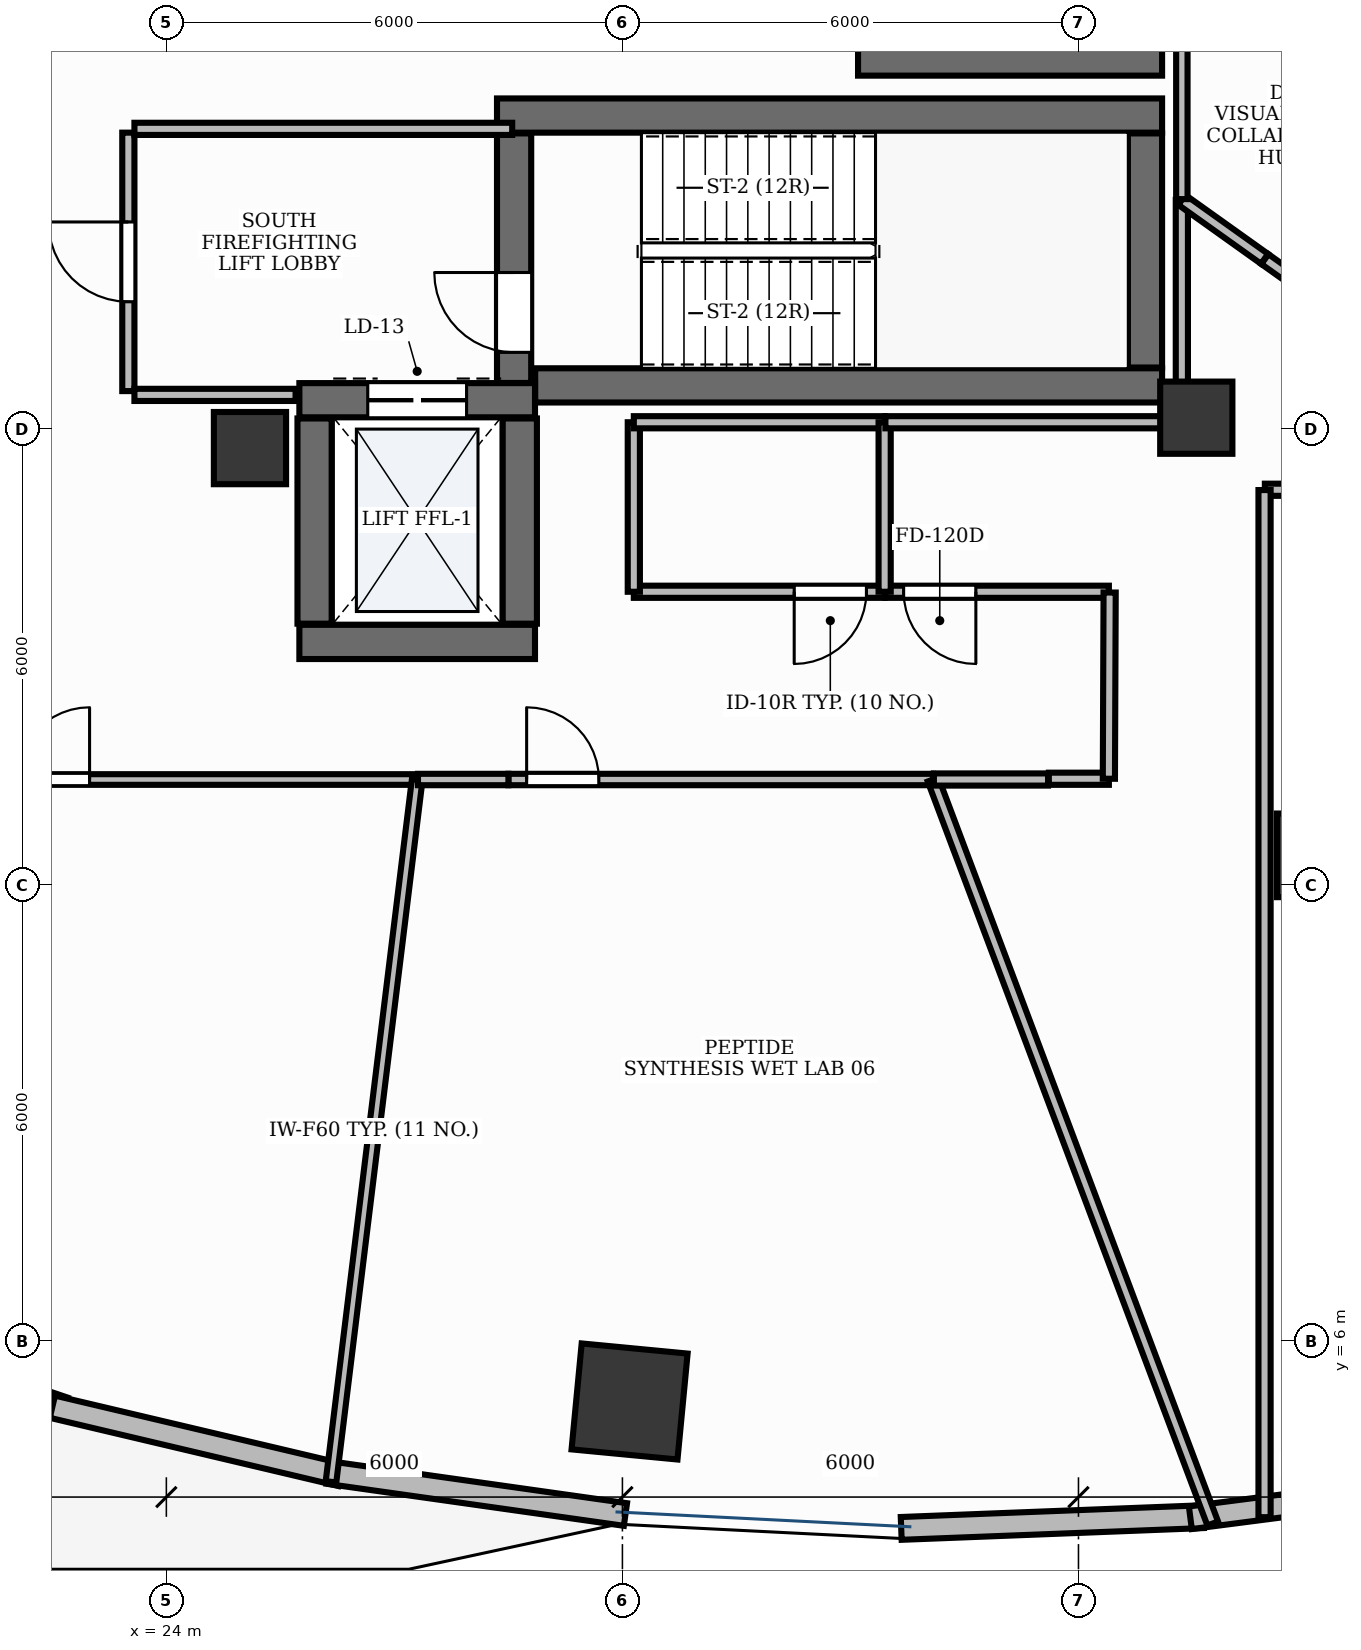
"""IFC4 building model, lengths in metres.
Left out: names, types, materials, properties, quantities, classifications, styles, units other than length and angle.
Written with IfcOpenShell. Run it as: python <this file> out.ifc"""

import sys

from ifc_helpers import new_model, si_unit, direction, frame, frame_2d, origin, origin_2d, place, context, subcontext, project, spatial, rectangle, extrude, element, fill, save


model = new_model("IFC4")
c1 = context("Model", 3, precision=1e-05, world=origin(), true_north=direction((0.0, 1.0)))
c2 = subcontext(c1, "Body", "Model", "MODEL_VIEW")
j1 = project(units=[si_unit("LENGTHUNIT", "METRE"), si_unit("PLANEANGLEUNIT", "RADIAN")], contexts=[c1])
p1 = place(None, origin())
s1 = spatial("IfcSite", under=j1, at=p1, CompositionType="ELEMENT")
p2 = place(p1, origin())
s2 = spatial("IfcBuilding", under=s1, at=p2, CompositionType="ELEMENT")
p3 = place(p2, frame((0.0, 0.0, 59.4)))
s3 = spatial("IfcBuildingStorey", under=s2, at=p3, CompositionType="ELEMENT", Elevation=59.4)
p4 = place(p3, frame((28.852, 18.575, 0.0), z_axis=(0.0, 0.0, 1.0), x_axis=(1.0, 0.0, 0.0)))
e1 = element("IfcWall", 1, at=p4, inside=s3, PredefinedType="SHEAR", context=c2, shape_type="SweptSolid", body=[
    extrude(rectangle(XDim=8.248, YDim=0.45, at=frame_2d((4.124, 0.0))), origin(), (0.0, 0.0, 1.0), 3.9),
])
p5 = place(p3, frame((28.35, 22.125, 0.0), z_axis=(0.0, 0.0, 1.0), x_axis=(1.0, 0.0, 0.0)))
e2 = element("IfcWall", 2, at=p5, inside=s3, PredefinedType="SHEAR", context=c2, shape_type="SweptSolid", body=[
    extrude(rectangle(XDim=8.75, YDim=0.45, at=frame_2d((4.375, 0.0))), origin(), (0.0, 0.0, 1.0), 3.9),
])
p6 = place(p3, frame((36.875, 18.81, 0.0), z_axis=(0.0, 0.0, 1.0), x_axis=(0.0, 1.0, 0.0)))
e3 = element("IfcWall", 3, at=p6, inside=s3, PredefinedType="SHEAR", context=c2, shape_type="SweptSolid", body=[
    extrude(rectangle(XDim=3.08, YDim=0.45, at=frame_2d((1.54, 0.0))), origin(), (0.0, 0.0, 1.0), 3.9),
])
p7 = place(p3, frame((28.575, 18.607, 0.0), z_axis=(0.0, 0.0, 1.0), x_axis=(0.0, 1.0, 0.0)))
e4 = element("IfcWall", 4, at=p7, inside=s3, PredefinedType="SHEAR", context=c2, shape_type="SweptSolid", body=[
    extrude(rectangle(XDim=3.283, YDim=0.45, at=frame_2d((1.642, 0.0))), origin(), (0.0, 0.0, 1.0), 3.9),
])
p8 = place(p7, frame((0.403, 0.0, 0.0)))
e5 = element("IfcOpeningElement", 5, at=p8, cuts=e4, PredefinedType="OPENING", context=c2, shape_type="SweptSolid", body=[
    extrude(rectangle(XDim=1.05, YDim=2.15, at=frame_2d((0.525, 1.075))), frame((0.0, 0.24, 0.0), z_axis=(0.0, -1.0, 0.0), x_axis=(1.0, 0.0, 0.0)), (0.0, 0.0, 1.0), 0.48),
])
p9 = place(p3, frame((33.1, 22.875, 0.0), z_axis=(0.0, 0.0, 1.0), x_axis=(1.0, 0.0, 0.0)))
e6 = element("IfcWall", 6, at=p9, inside=s3, PredefinedType="SHEAR", context=c2, shape_type="SweptSolid", body=[
    extrude(rectangle(XDim=4.0, YDim=0.45, at=frame_2d((2.0, 0.0))), origin(), (0.0, 0.0, 1.0), 3.9),
])
p10 = place(p3, frame((25.75, 15.2, 0.0), z_axis=(0.0, 0.0, 1.0), x_axis=(1.0, 0.0, 0.0)))
e7 = element("IfcWall", 7, at=p10, inside=s3, PredefinedType="SHEAR", context=c2, shape_type="SweptSolid", body=[
    extrude(rectangle(XDim=3.1, YDim=0.45, at=frame_2d((1.55, 0.0))), origin(), (0.0, 0.0, 1.0), 3.9),
])
p11 = place(p3, frame((25.75, 18.38, 0.0), z_axis=(0.0, 0.0, 1.0), x_axis=(1.0, 0.0, 0.0)))
e8 = element("IfcWall", 8, at=p11, inside=s3, PredefinedType="SHEAR", context=c2, shape_type="SweptSolid", body=[
    extrude(rectangle(XDim=3.1, YDim=0.45, at=frame_2d((1.55, 0.0))), origin(), (0.0, 0.0, 1.0), 3.9),
])
p12 = place(p11, frame((0.9, 0.0, 0.0)))
e9 = element("IfcOpeningElement", 9, at=p12, cuts=e8, PredefinedType="OPENING", context=c2, shape_type="SweptSolid", body=[
    extrude(rectangle(XDim=1.3, YDim=2.2, at=frame_2d((0.65, 1.1))), frame((0.0, 0.24, 0.0), z_axis=(0.0, -1.0, 0.0), x_axis=(1.0, 0.0, 0.0)), (0.0, 0.0, 1.0), 0.48),
])
for number, where, z_axis, x_axis in (
    (10, (25.95, 15.44, 0.0), (0.0, 0.0, 1.0), (0.0, 1.0, 0.0)),
    (11, (28.65, 15.44, 0.0), (0.0, 0.0, 1.0), (0.0, 1.0, 0.0)),
):
    element("IfcWall", number, at=place(p3, frame(where, z_axis=z_axis, x_axis=x_axis)), inside=s3, PredefinedType="SHEAR", context=c2, shape_type="SweptSolid", body=[
        extrude(rectangle(XDim=2.7, YDim=0.45, at=frame_2d((1.35, 0.0))), origin(), (0.0, 0.0, 1.0), 3.9),
    ])
for number, where, z_axis, x_axis in (
    (12, (25.1, 17.75, -0.0), (0.0, 0.0, 1.0), (1.0, 0.0, 0.0)),
    (13, (37.55, 18.15, -0.0), (0.0, 0.0, 1.0), (1.0, 0.0, 0.0)),
):
    element("IfcColumn", number, at=place(p3, frame(where, z_axis=z_axis, x_axis=x_axis)), inside=s3, PredefinedType="PILASTER", context=c2, shape_type="SweptSolid", body=[
        extrude(rectangle(XDim=0.95, YDim=0.95, at=origin_2d()), origin(), (0.0, 0.0, 1.0), 3.901),
    ])
p13 = place(p3, frame((30.094, 5.208, -0.0), z_axis=(0.0, 0.0, 1.0), x_axis=(-0.995462868748, 0.095150811579, 0.0)))
e14 = element("IfcColumn", 14, at=p13, inside=s3, PredefinedType="COLUMN", context=c2, shape_type="SweptSolid", body=[
    extrude(rectangle(XDim=1.4, YDim=1.4, at=origin_2d()), origin(), (0.0, 0.0, 1.0), 3.901),
])
p14 = place(p3, frame((39.161, 12.392, -0.0), z_axis=(0.0, 0.0, 1.0), x_axis=(1.0, 0.0, 0.0)))
e15 = element("IfcColumn", 15, at=p14, inside=s3, PredefinedType="COLUMN", context=c2, shape_type="SweptSolid", body=[
    extrude(rectangle(XDim=1.1, YDim=1.1, at=origin_2d()), origin(), (0.0, 0.0, 1.0), 3.901),
])
p15 = place(p3, frame((19.065, 6.333, 0.0), z_axis=(0.0, 0.0, 1.0), x_axis=(0.947034337234, -0.321132315564, 0.0)))
e16 = element("IfcWall", 16, at=p15, inside=s3, PredefinedType="STANDARD", context=c2, shape_type="SweptSolid", body=[
    extrude(rectangle(XDim=3.79, YDim=0.3, at=frame_2d((1.895, 0.0))), origin(), (0.0, 0.0, 1.0), 3.9),
])
p16 = place(p15, frame((1.345, 0.0, 0.0)))
e17 = element("IfcOpeningElement", 17, at=p16, cuts=e16, PredefinedType="OPENING", context=c2, shape_type="SweptSolid", body=[
    extrude(rectangle(XDim=1.1, YDim=2.15, at=frame_2d((0.55, 1.075))), frame((0.0, 0.165, 0.0), z_axis=(0.0, -1.0, 0.0), x_axis=(1.0, 0.0, 0.0)), (0.0, 0.0, 1.0), 0.33),
])
p17 = place(p3, frame((22.5, 5.138, 0.0), z_axis=(0.0, 0.0, 1.0), x_axis=(0.973197600754, -0.229970497863, 0.0)))
e18 = element("IfcWall", 18, at=p17, inside=s3, PredefinedType="STANDARD", context=c2, shape_type="SweptSolid", body=[
    extrude(rectangle(XDim=3.901, YDim=0.3, at=frame_2d((1.951, 0.0))), origin(), (0.0, 0.0, 1.0), 3.9),
])
p18 = place(p3, frame((26.128, 4.273, 0.0), z_axis=(0.0, 0.0, 1.0), x_axis=(0.990165832998, -0.139898617443, 0.0)))
e19 = element("IfcWall", 19, at=p18, inside=s3, PredefinedType="STANDARD", context=c2, shape_type="SweptSolid", body=[
    extrude(rectangle(XDim=3.951, YDim=0.3, at=frame_2d((1.976, 0.0))), origin(), (0.0, 0.0, 1.0), 3.9),
])
p19 = place(p3, frame((33.668, 3.538, 0.0), z_axis=(0.0, 0.0, 1.0), x_axis=(0.999245411623, 0.038840794937, 0.0)))
e20 = element("IfcWall", 20, at=p19, inside=s3, PredefinedType="STANDARD", context=c2, shape_type="SweptSolid", body=[
    extrude(rectangle(XDim=3.979, YDim=0.3, at=frame_2d((1.989, 0.0))), origin(), (0.0, 0.0, 1.0), 3.9),
])
p20 = place(p3, frame((37.472, 3.678, 0.0), z_axis=(0.0, 0.0, 1.0), x_axis=(0.991734095036, 0.128310111617, 0.0)))
e21 = element("IfcWall", 21, at=p20, inside=s3, PredefinedType="STANDARD", context=c2, shape_type="SweptSolid", body=[
    extrude(rectangle(XDim=3.956, YDim=0.3, at=frame_2d((1.978, 0.0))), origin(), (0.0, 0.0, 1.0), 3.9),
])
p21 = place(p3, frame((23.5, 18.5, 0.0), z_axis=(0.0, 0.0, 1.0), x_axis=(0.0, 1.0, 0.0)))
e22 = element("IfcWall", 22, at=p21, inside=s3, PredefinedType="PARTITIONING", context=c2, shape_type="SweptSolid", body=[
    extrude(rectangle(XDim=3.4, YDim=0.16, at=frame_2d((1.7, 0.0))), origin(), (0.0, 0.0, 1.0), 2.91),
])
p22 = place(p21, frame((1.175, 0.0, 0.0)))
e23 = element("IfcOpeningElement", 23, at=p22, cuts=e22, PredefinedType="OPENING", context=c2, shape_type="SweptSolid", body=[
    extrude(rectangle(XDim=1.05, YDim=2.15, at=frame_2d((0.525, 1.075))), frame((0.0, 0.095, 0.0), z_axis=(0.0, -1.0, 0.0), x_axis=(1.0, 0.0, 0.0)), (0.0, 0.0, 1.0), 0.19),
])
p23 = place(p3, frame((23.58, 21.95, 0.0), z_axis=(0.0, 0.0, 1.0), x_axis=(1.0, 0.0, 0.0)))
e24 = element("IfcWall", 24, at=p23, inside=s3, PredefinedType="PARTITIONING", context=c2, shape_type="SweptSolid", body=[
    extrude(rectangle(XDim=4.97, YDim=0.16, at=frame_2d((2.485, 0.0))), origin(), (0.0, 0.0, 1.0), 2.91),
])
p24 = place(p3, frame((23.58, 18.45, 0.0), z_axis=(0.0, 0.0, 1.0), x_axis=(1.0, 0.0, 0.0)))
e25 = element("IfcWall", 25, at=p24, inside=s3, PredefinedType="PARTITIONING", context=c2, shape_type="SweptSolid", body=[
    extrude(rectangle(XDim=2.12, YDim=0.16, at=frame_2d((1.06, 0.0))), origin(), (0.0, 0.0, 1.0), 2.91),
])
p25 = place(p3, frame((33.45, 15.86, 0.0), z_axis=(0.0, 0.0, 1.0), x_axis=(-1.0, 0.0, 0.0)))
e26 = element("IfcWall", 26, at=p25, inside=s3, PredefinedType="PARTITIONING", context=c2, shape_type="SweptSolid", body=[
    extrude(rectangle(XDim=3.3, YDim=0.16, at=frame_2d((1.65, 0.0))), origin(), (0.0, 0.0, 1.0), 2.91),
])
p26 = place(p25, frame((0.24, 0.0, 0.0)))
e27 = element("IfcOpeningElement", 27, at=p26, cuts=e26, PredefinedType="OPENING", context=c2, shape_type="SweptSolid", body=[
    extrude(rectangle(XDim=0.95, YDim=2.15, at=frame_2d((0.475, 1.075))), frame((0.0, 0.095, 0.0), z_axis=(0.0, -1.0, 0.0), x_axis=(1.0, 0.0, 0.0)), (0.0, 0.0, 1.0), 0.19),
])
p27 = place(p3, frame((21.8, 13.39, 0.0), z_axis=(0.0, 0.0, 1.0), x_axis=(1.0, 0.0, 0.0)))
e28 = element("IfcWall", 28, at=p27, inside=s3, PredefinedType="PARTITIONING", context=c2, shape_type="SweptSolid", body=[
    extrude(rectangle(XDim=5.5, YDim=0.14, at=frame_2d((2.75, 0.0))), origin(), (0.0, 0.0, 1.0), 2.91),
])
p28 = place(p27, frame((0.24, 0.0, 0.0)))
e29 = element("IfcOpeningElement", 29, at=p28, cuts=e28, PredefinedType="OPENING", context=c2, shape_type="SweptSolid", body=[
    extrude(rectangle(XDim=0.95, YDim=2.15, at=frame_2d((0.475, 1.075))), frame((0.0, 0.085, 0.0), z_axis=(0.0, -1.0, 0.0), x_axis=(1.0, 0.0, 0.0)), (0.0, 0.0, 1.0), 0.17),
])
p29 = place(p3, frame((28.5, 13.39, 0.0), z_axis=(0.0, 0.0, 1.0), x_axis=(1.0, 0.0, 0.0)))
e30 = element("IfcWall", 30, at=p29, inside=s3, PredefinedType="PARTITIONING", context=c2, shape_type="SweptSolid", body=[
    extrude(rectangle(XDim=5.587, YDim=0.15, at=frame_2d((2.793, 0.0))), origin(), (0.0, 0.0, 1.0), 2.91),
])
p30 = place(p29, frame((0.24, 0.0, 0.0)))
e31 = element("IfcOpeningElement", 31, at=p30, cuts=e30, PredefinedType="OPENING", context=c2, shape_type="SweptSolid", body=[
    extrude(rectangle(XDim=0.95, YDim=2.15, at=frame_2d((0.475, 1.075))), frame((0.0, 0.09, 0.0), z_axis=(0.0, -1.0, 0.0), x_axis=(1.0, 0.0, 0.0)), (0.0, 0.0, 1.0), 0.18),
])
p31 = place(p3, frame((36.4, 15.86, 0.0), z_axis=(0.0, 0.0, 1.0), x_axis=(-1.0, 0.0, 0.0)))
e32 = element("IfcWall", 32, at=p31, inside=s3, PredefinedType="PARTITIONING", context=c2, shape_type="SweptSolid", body=[
    extrude(rectangle(XDim=2.94, YDim=0.16, at=frame_2d((1.47, 0.0))), origin(), (0.0, 0.0, 1.0), 2.91),
])
p32 = place(p31, frame((1.75, 0.0, 0.0)))
e33 = element("IfcOpeningElement", 33, at=p32, cuts=e32, PredefinedType="OPENING", context=c2, shape_type="SweptSolid", body=[
    extrude(rectangle(XDim=0.95, YDim=2.15, at=frame_2d((0.475, 1.075))), frame((0.0, 0.095, 0.0), z_axis=(0.0, -1.0, 0.0), x_axis=(1.0, 0.0, 0.0)), (0.0, 0.0, 1.0), 0.19),
])
p33 = place(p3, frame((30.15, 15.86, 0.0), z_axis=(0.0, 0.0, 1.0), x_axis=(0.0, 1.0, 0.0)))
e34 = element("IfcWall", 34, at=p33, inside=s3, PredefinedType="PARTITIONING", context=c2, shape_type="SweptSolid", body=[
    extrude(rectangle(XDim=2.23, YDim=0.16, at=frame_2d((1.115, 0.0))), origin(), (0.0, 0.0, 1.0), 2.91),
])
p34 = place(p3, frame((30.15, 18.09, 0.0), z_axis=(0.0, 0.0, 1.0), x_axis=(1.0, 0.0, 0.0)))
e35 = element("IfcWall", 35, at=p34, inside=s3, PredefinedType="PARTITIONING", context=c2, shape_type="SweptSolid", body=[
    extrude(rectangle(XDim=3.3, YDim=0.16, at=frame_2d((1.65, 0.0))), origin(), (0.0, 0.0, 1.0), 2.91),
])
p35 = place(p3, frame((33.45, 18.09, 0.0), z_axis=(0.0, 0.0, 1.0), x_axis=(0.0, -1.0, 0.0)))
e36 = element("IfcWall", 36, at=p35, inside=s3, PredefinedType="PARTITIONING", context=c2, shape_type="SweptSolid", body=[
    extrude(rectangle(XDim=2.23, YDim=0.16, at=frame_2d((1.115, 0.0))), origin(), (0.0, 0.0, 1.0), 2.91),
])
p36 = place(p3, frame((27.301, 13.39, 0.0), z_axis=(0.0, 0.0, 1.0), x_axis=(-0.121878156066, -0.992545069543, 0.0)))
e37 = element("IfcWall", 37, at=p36, inside=s3, PredefinedType="PARTITIONING", context=c2, shape_type="SweptSolid", body=[
    extrude(rectangle(XDim=9.309, YDim=0.14, at=frame_2d((4.654, 0.0))), origin(), (0.0, 0.0, 1.0), 2.91),
])
p37 = place(p3, frame((27.311, 13.39, 0.0), z_axis=(0.0, 0.0, 1.0), x_axis=(1.0, 0.0, 0.0)))
e38 = element("IfcWall", 38, at=p37, inside=s3, PredefinedType="PARTITIONING", context=c2, shape_type="SweptSolid", body=[
    extrude(rectangle(XDim=1.189, YDim=0.15, at=frame_2d((0.595, 0.0))), origin(), (0.0, 0.0, 1.0), 2.91),
])
p38 = place(p3, frame((34.087, 13.39, 0.0), z_axis=(0.0, 0.0, 1.0), x_axis=(0.351837225237, -0.936061198286, 0.0)))
e39 = element("IfcWall", 39, at=p38, inside=s3, PredefinedType="PARTITIONING", context=c2, shape_type="SweptSolid", body=[
    extrude(rectangle(XDim=10.456, YDim=0.15, at=frame_2d((5.228, 0.0))), origin(), (0.0, 0.0, 1.0), 2.91),
])
p39 = place(p3, frame((38.452, 20.237, 0.0), z_axis=(0.0, 0.0, 1.0), x_axis=(0.814086766517, -0.580743262192, 0.0)))
e40 = element("IfcWall", 40, at=p39, inside=s3, PredefinedType="PARTITIONING", context=c2, shape_type="SweptSolid", body=[
    extrude(rectangle(XDim=2.38, YDim=0.16, at=frame_2d((1.19, 0.0))), origin(), (0.0, 0.0, 1.0), 2.91),
])
p40 = place(p3, frame((40.39, 17.202, 0.0), z_axis=(0.0, 0.0, 1.0), x_axis=(-1.0, 0.0, 0.0)))
e41 = element("IfcWall", 41, at=p40, inside=s3, PredefinedType="PARTITIONING", context=c2, shape_type="SweptSolid", body=[
    extrude(rectangle(XDim=1.938, YDim=0.16, at=frame_2d((0.969, 0.0))), origin(), (0.0, 0.0, 1.0), 2.91),
])
p41 = place(p3, frame((38.448, 17.198, 0.0), z_axis=(0.0, 0.0, 1.0), x_axis=(0.0, -1.0, 0.0)))
e42 = element("IfcWall", 42, at=p41, inside=s3, PredefinedType="PARTITIONING", context=c2, shape_type="SweptSolid", body=[
    extrude(rectangle(XDim=13.513, YDim=0.16, at=frame_2d((6.756, 0.0))), origin(), (0.0, 0.0, 1.0), 2.91),
])
p42 = place(p3, frame((34.098, 13.39, 0.0), z_axis=(0.0, 0.0, 1.0), x_axis=(1.0, 0.0, 0.0)))
e43 = element("IfcWall", 43, at=p42, inside=s3, PredefinedType="PARTITIONING", context=c2, shape_type="SweptSolid", body=[
    extrude(rectangle(XDim=1.502, YDim=0.16, at=frame_2d((0.751, 0.0))), origin(), (0.0, 0.0, 1.0), 2.91),
])
p43 = place(p3, frame((35.61, 13.4, 0.0), z_axis=(0.0, 0.0, 1.0), x_axis=(1.0, 0.0, 0.0)))
e44 = element("IfcWall", 44, at=p43, inside=s3, PredefinedType="PARTITIONING", context=c2, shape_type="SweptSolid", body=[
    extrude(rectangle(XDim=0.79, YDim=0.16, at=frame_2d((0.395, 0.0))), origin(), (0.0, 0.0, 1.0), 2.91),
])
p44 = place(p3, frame((36.4, 13.4, 0.0), z_axis=(0.0, 0.0, 1.0), x_axis=(0.004085258855, 0.999991655295, 0.0)))
e45 = element("IfcWall", 45, at=p44, inside=s3, PredefinedType="PARTITIONING", context=c2, shape_type="SweptSolid", body=[
    extrude(rectangle(XDim=2.45, YDim=0.16, at=frame_2d((1.225, 0.0))), origin(), (0.0, 0.0, 1.0), 2.91),
])
p45 = place(p3, frame((33.46, 18.09, 0.0), z_axis=(0.0, 0.0, 1.0), x_axis=(1.0, 0.0, 0.0)))
e46 = element("IfcWall", 46, at=p45, inside=s3, PredefinedType="PARTITIONING", context=c2, shape_type="SweptSolid", body=[
    extrude(rectangle(XDim=3.89, YDim=0.16, at=frame_2d((1.945, 0.0))), origin(), (0.0, 0.0, 1.0), 2.91),
])
p46 = place(p3, frame((37.36, 18.1, 0.0), z_axis=(0.0, 0.0, 1.0), x_axis=(0.0, 1.0, 0.0)))
e47 = element("IfcWall", 47, at=p46, inside=s3, PredefinedType="PARTITIONING", context=c2, shape_type="SweptSolid", body=[
    extrude(rectangle(XDim=2.916, YDim=0.16, at=frame_2d((1.458, 0.0))), origin(), (0.0, 0.0, 1.0), 2.91),
])
p47 = place(p3, frame((37.36, 21.016, 0.0), z_axis=(0.0, 0.0, 1.0), x_axis=(0.814066623235, -0.580771498039, 0.0)))
e48 = element("IfcWall", 48, at=p47, inside=s3, PredefinedType="PARTITIONING", context=c2, shape_type="SweptSolid", body=[
    extrude(rectangle(XDim=1.336, YDim=0.16, at=frame_2d((0.668, 0.0))), origin(), (0.0, 0.0, 1.0), 2.91),
])
p48 = place(p3, frame((37.36, 21.026, 0.0), z_axis=(0.0, 0.0, 1.0), x_axis=(0.0, 1.0, 0.0)))
e49 = element("IfcWall", 49, at=p48, inside=s3, PredefinedType="PARTITIONING", context=c2, shape_type="SweptSolid", body=[
    extrude(rectangle(XDim=4.364, YDim=0.15, at=frame_2d((2.182, 0.0))), origin(), (0.0, 0.0, 1.0), 2.91),
])
p49 = place(p8, origin())
e50 = element("IfcDoor", 50, at=p49, inside=s3, OperationType="SINGLE_SWING_RIGHT", PredefinedType="DOOR", context=c2, shape_type="SweptSolid", body=[
    extrude(rectangle(XDim=1.05, YDim=2.15, at=frame_2d((0.525, 1.075))), frame((0.0, 0.025, 0.0), z_axis=(0.0, -1.0, 0.0), x_axis=(1.0, 0.0, 0.0)), (0.0, 0.0, 1.0), 0.05),
])
fill(e5, e50)
p50 = place(p12, origin())
e51 = element("IfcDoor", 51, at=p50, inside=s3, OperationType="DOUBLE_DOOR_SLIDING", PredefinedType="DOOR", context=c2, shape_type="SweptSolid", body=[
    extrude(rectangle(XDim=1.3, YDim=2.2, at=frame_2d((0.65, 1.1))), frame((0.0, 0.025, 0.0), z_axis=(0.0, -1.0, 0.0), x_axis=(1.0, 0.0, 0.0)), (0.0, 0.0, 1.0), 0.05),
])
fill(e9, e51)
p51 = place(p22, origin())
e52 = element("IfcDoor", 52, at=p51, inside=s3, OperationType="SINGLE_SWING_RIGHT", PredefinedType="DOOR", context=c2, shape_type="SweptSolid", body=[
    extrude(rectangle(XDim=1.05, YDim=2.15, at=frame_2d((0.525, 1.075))), frame((0.0, 0.025, 0.0), z_axis=(0.0, -1.0, 0.0), x_axis=(1.0, 0.0, 0.0)), (0.0, 0.0, 1.0), 0.05),
])
fill(e23, e52)
p52 = place(p26, origin())
e53 = element("IfcDoor", 53, at=p52, inside=s3, OperationType="SINGLE_SWING_RIGHT", PredefinedType="DOOR", context=c2, shape_type="SweptSolid", body=[
    extrude(rectangle(XDim=0.95, YDim=2.15, at=frame_2d((0.475, 1.075))), frame((0.0, 0.025, 0.0), z_axis=(0.0, -1.0, 0.0), x_axis=(1.0, 0.0, 0.0)), (0.0, 0.0, 1.0), 0.05),
])
fill(e27, e53)
p53 = place(p28, origin())
e54 = element("IfcDoor", 54, at=p53, inside=s3, OperationType="SINGLE_SWING_RIGHT", PredefinedType="DOOR", context=c2, shape_type="SweptSolid", body=[
    extrude(rectangle(XDim=0.95, YDim=2.15, at=frame_2d((0.475, 1.075))), frame((0.0, 0.025, 0.0), z_axis=(0.0, -1.0, 0.0), x_axis=(1.0, 0.0, 0.0)), (0.0, 0.0, 1.0), 0.05),
])
fill(e29, e54)
p54 = place(p30, origin())
e55 = element("IfcDoor", 55, at=p54, inside=s3, OperationType="SINGLE_SWING_LEFT", PredefinedType="DOOR", context=c2, shape_type="SweptSolid", body=[
    extrude(rectangle(XDim=0.95, YDim=2.15, at=frame_2d((0.475, 1.075))), frame((0.0, 0.025, 0.0), z_axis=(0.0, -1.0, 0.0), x_axis=(1.0, 0.0, 0.0)), (0.0, 0.0, 1.0), 0.05),
])
fill(e31, e55)
p55 = place(p32, origin())
e56 = element("IfcDoor", 56, at=p55, inside=s3, OperationType="SINGLE_SWING_LEFT", PredefinedType="DOOR", context=c2, shape_type="SweptSolid", body=[
    extrude(rectangle(XDim=0.95, YDim=2.15, at=frame_2d((0.475, 1.075))), frame((0.0, 0.025, 0.0), z_axis=(0.0, -1.0, 0.0), x_axis=(1.0, 0.0, 0.0)), (0.0, 0.0, 1.0), 0.05),
])
fill(e33, e56)
save(model, sys.argv[1])
